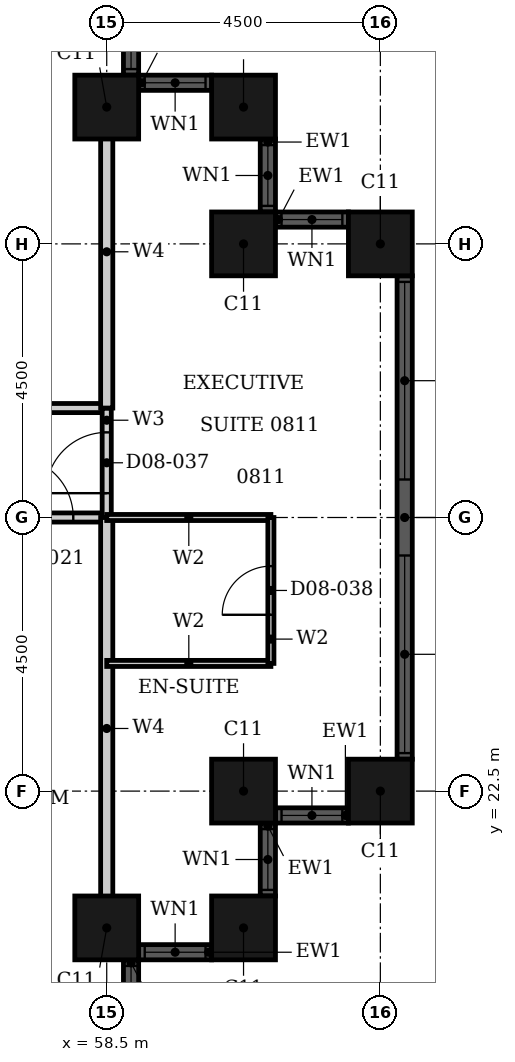
"""IFC4 building model, lengths in metres.
Left out: names, types, materials, properties, quantities, classifications, styles, units other than length and angle.
Written with IfcOpenShell. Run it as: python <this file> out.ifc"""

import sys

from ifc_helpers import new_model, si_unit, direction, frame, frame_2d, origin, origin_2d, place, context, subcontext, project, spatial, rectangle, hollow_rectangle, extrude, element, fill, save


model = new_model("IFC4")
c1 = context("Model", 3, precision=1e-05, world=origin(), true_north=direction((0.0, 1.0)))
c2 = subcontext(c1, "Body", "Model", "MODEL_VIEW")
j1 = project(units=[si_unit("LENGTHUNIT", "METRE"), si_unit("PLANEANGLEUNIT", "RADIAN")], contexts=[c1])
p1 = place(None, origin())
s1 = spatial("IfcSite", under=j1, at=p1, CompositionType="ELEMENT")
p2 = place(p1, origin())
s2 = spatial("IfcBuilding", under=s1, at=p2, CompositionType="ELEMENT")
p3 = place(p2, frame((0.0, 0.0, 40.8)))
s3 = spatial("IfcBuildingStorey", under=s2, at=p3, CompositionType="ELEMENT", Elevation=40.8)
for number, where, z_axis, x_axis in (
    (1, (58.5, 20.25, 0.0), (0.0, 0.0, 1.0), (1.0, 0.0, 0.0)),
    (2, (60.75, 20.25, 0.0), (0.0, 0.0, 1.0), (1.0, 0.0, 0.0)),
    (3, (60.75, 22.5, 0.0), (0.0, 0.0, 1.0), (1.0, 0.0, 0.0)),
    (4, (63.0, 22.5, 0.0), (0.0, 0.0, 1.0), (1.0, 0.0, 0.0)),
    (5, (63.0, 31.5, 0.0), (0.0, 0.0, 1.0), (1.0, 0.0, 0.0)),
    (6, (60.75, 31.5, 0.0), (0.0, 0.0, 1.0), (1.0, 0.0, 0.0)),
    (7, (60.75, 33.75, 0.0), (0.0, 0.0, 1.0), (1.0, 0.0, 0.0)),
    (8, (58.5, 33.75, 0.0), (0.0, 0.0, 1.0), (1.0, 0.0, 0.0)),
):
    element("IfcColumn", number, at=place(p3, frame(where, z_axis=z_axis, x_axis=x_axis)), inside=s3, PredefinedType="COLUMN", context=c2, shape_type="SweptSolid", body=[
        extrude(hollow_rectangle(XDim=1.05, YDim=1.05, WallThickness=0.034, at=origin_2d()), origin(), (0.0, 0.0, 1.0), 3.6),
    ])
p4 = place(p3, frame((58.9, 18.525, 0.0), z_axis=(0.0, 0.0, 1.0), x_axis=(0.0, 1.0, 0.0)))
e9 = element("IfcWall", 9, at=p4, inside=s3, PredefinedType="SOLIDWALL", context=c2, shape_type="SweptSolid", body=[
    extrude(rectangle(XDim=1.2, YDim=0.25, at=frame_2d((0.6, 0.0))), origin(), (0.0, 0.0, 1.0), 3.6),
])
p5 = place(p4, frame((0.1, 0.0, 0.9)))
e10 = element("IfcOpeningElement", 10, at=p5, cuts=e9, PredefinedType="OPENING", context=c2, shape_type="SweptSolid", body=[
    extrude(rectangle(XDim=1.0, YDim=2.08, at=frame_2d((0.5, 1.04))), frame((0.0, 0.135, 0.0), z_axis=(0.0, -1.0, 0.0), x_axis=(1.0, 0.0, 0.0)), (0.0, 0.0, 1.0), 0.27),
])
p6 = place(p3, frame((59.025, 19.85, 0.0), z_axis=(0.0, 0.0, 1.0), x_axis=(1.0, 0.0, 0.0)))
e11 = element("IfcWall", 11, at=p6, inside=s3, PredefinedType="SOLIDWALL", context=c2, shape_type="SweptSolid", body=[
    extrude(rectangle(XDim=1.2, YDim=0.25, at=frame_2d((0.6, 0.0))), origin(), (0.0, 0.0, 1.0), 3.6),
])
p7 = place(p6, frame((0.1, 0.0, 0.9)))
e12 = element("IfcOpeningElement", 12, at=p7, cuts=e11, PredefinedType="OPENING", context=c2, shape_type="SweptSolid", body=[
    extrude(rectangle(XDim=1.0, YDim=2.08, at=frame_2d((0.5, 1.04))), frame((0.0, 0.135, 0.0), z_axis=(0.0, -1.0, 0.0), x_axis=(1.0, 0.0, 0.0)), (0.0, 0.0, 1.0), 0.27),
])
p8 = place(p3, frame((61.15, 20.775, 0.0), z_axis=(0.0, 0.0, 1.0), x_axis=(0.0, 1.0, 0.0)))
e13 = element("IfcWall", 13, at=p8, inside=s3, PredefinedType="SOLIDWALL", context=c2, shape_type="SweptSolid", body=[
    extrude(rectangle(XDim=1.2, YDim=0.25, at=frame_2d((0.6, 0.0))), origin(), (0.0, 0.0, 1.0), 3.6),
])
p9 = place(p8, frame((0.1, 0.0, 0.9)))
e14 = element("IfcOpeningElement", 14, at=p9, cuts=e13, PredefinedType="OPENING", context=c2, shape_type="SweptSolid", body=[
    extrude(rectangle(XDim=1.0, YDim=2.08, at=frame_2d((0.5, 1.04))), frame((0.0, 0.135, 0.0), z_axis=(0.0, -1.0, 0.0), x_axis=(1.0, 0.0, 0.0)), (0.0, 0.0, 1.0), 0.27),
])
p10 = place(p3, frame((61.275, 22.1, 0.0), z_axis=(0.0, 0.0, 1.0), x_axis=(1.0, 0.0, 0.0)))
e15 = element("IfcWall", 15, at=p10, inside=s3, PredefinedType="SOLIDWALL", context=c2, shape_type="SweptSolid", body=[
    extrude(rectangle(XDim=1.2, YDim=0.25, at=frame_2d((0.6, 0.0))), origin(), (0.0, 0.0, 1.0), 3.6),
])
p11 = place(p10, frame((0.1, 0.0, 0.9)))
e16 = element("IfcOpeningElement", 16, at=p11, cuts=e15, PredefinedType="OPENING", context=c2, shape_type="SweptSolid", body=[
    extrude(rectangle(XDim=1.0, YDim=2.08, at=frame_2d((0.5, 1.04))), frame((0.0, 0.135, 0.0), z_axis=(0.0, -1.0, 0.0), x_axis=(1.0, 0.0, 0.0)), (0.0, 0.0, 1.0), 0.27),
])
p12 = place(p3, frame((63.4, 23.025, 0.0), z_axis=(0.0, 0.0, 1.0), x_axis=(0.0, 1.0, 0.0)))
e17 = element("IfcWall", 17, at=p12, inside=s3, PredefinedType="SOLIDWALL", context=c2, shape_type="SweptSolid", body=[
    extrude(rectangle(XDim=7.95, YDim=0.25, at=frame_2d((3.975, 0.0))), origin(), (0.0, 0.0, 1.0), 3.6),
])
p13 = place(p12, frame((0.1, 0.0, 0.9)))
e18 = element("IfcOpeningElement", 18, at=p13, cuts=e17, PredefinedType="OPENING", context=c2, shape_type="SweptSolid", body=[
    extrude(rectangle(XDim=3.25, YDim=2.08, at=frame_2d((1.625, 1.04))), frame((0.0, 0.135, 0.0), z_axis=(0.0, -1.0, 0.0), x_axis=(1.0, 0.0, 0.0)), (0.0, 0.0, 1.0), 0.27),
])
p14 = place(p12, frame((4.6, 0.0, 0.9)))
e19 = element("IfcOpeningElement", 19, at=p14, cuts=e17, PredefinedType="OPENING", context=c2, shape_type="SweptSolid", body=[
    extrude(rectangle(XDim=3.25, YDim=2.08, at=frame_2d((1.625, 1.04))), frame((0.0, 0.135, 0.0), z_axis=(0.0, -1.0, 0.0), x_axis=(1.0, 0.0, 0.0)), (0.0, 0.0, 1.0), 0.27),
])
p15 = place(p3, frame((62.475, 31.9, 0.0), z_axis=(0.0, 0.0, 1.0), x_axis=(-1.0, 0.0, 0.0)))
e20 = element("IfcWall", 20, at=p15, inside=s3, PredefinedType="SOLIDWALL", context=c2, shape_type="SweptSolid", body=[
    extrude(rectangle(XDim=1.2, YDim=0.25, at=frame_2d((0.6, 0.0))), origin(), (0.0, 0.0, 1.0), 3.6),
])
p16 = place(p15, frame((0.1, 0.0, 0.9)))
e21 = element("IfcOpeningElement", 21, at=p16, cuts=e20, PredefinedType="OPENING", context=c2, shape_type="SweptSolid", body=[
    extrude(rectangle(XDim=1.0, YDim=2.08, at=frame_2d((0.5, 1.04))), frame((0.0, 0.135, 0.0), z_axis=(0.0, -1.0, 0.0), x_axis=(1.0, 0.0, 0.0)), (0.0, 0.0, 1.0), 0.27),
])
p17 = place(p3, frame((61.15, 32.025, 0.0), z_axis=(0.0, 0.0, 1.0), x_axis=(0.0, 1.0, 0.0)))
e22 = element("IfcWall", 22, at=p17, inside=s3, PredefinedType="SOLIDWALL", context=c2, shape_type="SweptSolid", body=[
    extrude(rectangle(XDim=1.2, YDim=0.25, at=frame_2d((0.6, 0.0))), origin(), (0.0, 0.0, 1.0), 3.6),
])
p18 = place(p17, frame((0.1, 0.0, 0.9)))
e23 = element("IfcOpeningElement", 23, at=p18, cuts=e22, PredefinedType="OPENING", context=c2, shape_type="SweptSolid", body=[
    extrude(rectangle(XDim=1.0, YDim=2.08, at=frame_2d((0.5, 1.04))), frame((0.0, 0.135, 0.0), z_axis=(0.0, -1.0, 0.0), x_axis=(1.0, 0.0, 0.0)), (0.0, 0.0, 1.0), 0.27),
])
p19 = place(p3, frame((60.225, 34.15, 0.0), z_axis=(0.0, 0.0, 1.0), x_axis=(-1.0, 0.0, 0.0)))
e24 = element("IfcWall", 24, at=p19, inside=s3, PredefinedType="SOLIDWALL", context=c2, shape_type="SweptSolid", body=[
    extrude(rectangle(XDim=1.2, YDim=0.25, at=frame_2d((0.6, 0.0))), origin(), (0.0, 0.0, 1.0), 3.6),
])
p20 = place(p19, frame((0.1, 0.0, 0.9)))
e25 = element("IfcOpeningElement", 25, at=p20, cuts=e24, PredefinedType="OPENING", context=c2, shape_type="SweptSolid", body=[
    extrude(rectangle(XDim=1.0, YDim=2.08, at=frame_2d((0.5, 1.04))), frame((0.0, 0.135, 0.0), z_axis=(0.0, -1.0, 0.0), x_axis=(1.0, 0.0, 0.0)), (0.0, 0.0, 1.0), 0.27),
])
p21 = place(p3, frame((58.9, 34.275, 0.0), z_axis=(0.0, 0.0, 1.0), x_axis=(0.0, 1.0, 0.0)))
e26 = element("IfcWall", 26, at=p21, inside=s3, PredefinedType="SOLIDWALL", context=c2, shape_type="SweptSolid", body=[
    extrude(rectangle(XDim=1.2, YDim=0.25, at=frame_2d((0.6, 0.0))), origin(), (0.0, 0.0, 1.0), 3.6),
])
p22 = place(p21, frame((0.1, 0.0, 0.9)))
e27 = element("IfcOpeningElement", 27, at=p22, cuts=e26, PredefinedType="OPENING", context=c2, shape_type="SweptSolid", body=[
    extrude(rectangle(XDim=1.0, YDim=2.08, at=frame_2d((0.5, 1.04))), frame((0.0, 0.135, 0.0), z_axis=(0.0, -1.0, 0.0), x_axis=(1.0, 0.0, 0.0)), (0.0, 0.0, 1.0), 0.27),
])
p23 = place(p3, frame((46.8, 27.0, 0.0), z_axis=(0.0, 0.0, 1.0), x_axis=(1.0, 0.0, 0.0)))
e28 = element("IfcWall", 28, at=p23, inside=s3, PredefinedType="PARTITIONING", context=c2, shape_type="SweptSolid", body=[
    extrude(rectangle(XDim=11.7, YDim=0.15, at=frame_2d((5.85, 0.0))), origin(), (0.0, 0.0, 1.0), 2.58),
])
p24 = place(p23, frame((5.65, 0.0, 0.0)))
e29 = element("IfcOpeningElement", 29, at=p24, cuts=e28, PredefinedType="OPENING", context=c2, shape_type="SweptSolid", body=[
    extrude(rectangle(XDim=1.0, YDim=2.1, at=frame_2d((0.5, 1.05))), frame((0.0, 0.085, 0.0), z_axis=(0.0, -1.0, 0.0), x_axis=(1.0, 0.0, 0.0)), (0.0, 0.0, 1.0), 0.17),
])
p25 = place(p23, frame((10.15, 0.0, 0.0)))
e30 = element("IfcOpeningElement", 30, at=p25, cuts=e28, PredefinedType="OPENING", context=c2, shape_type="SweptSolid", body=[
    extrude(rectangle(XDim=1.0, YDim=2.1, at=frame_2d((0.5, 1.05))), frame((0.0, 0.085, 0.0), z_axis=(0.0, -1.0, 0.0), x_axis=(1.0, 0.0, 0.0)), (0.0, 0.0, 1.0), 0.17),
])
p26 = place(p3, frame((46.8, 28.8, 0.0), z_axis=(0.0, 0.0, 1.0), x_axis=(1.0, 0.0, 0.0)))
e31 = element("IfcWall", 31, at=p26, inside=s3, PredefinedType="PARTITIONING", context=c2, shape_type="SweptSolid", body=[
    extrude(rectangle(XDim=11.7, YDim=0.15, at=frame_2d((5.85, 0.0))), origin(), (0.0, 0.0, 1.0), 3.3),
])
p27 = place(p26, frame((4.45, 0.0, 0.0)))
e32 = element("IfcOpeningElement", 32, at=p27, cuts=e31, PredefinedType="OPENING", context=c2, shape_type="SweptSolid", body=[
    extrude(rectangle(XDim=1.0, YDim=2.1, at=frame_2d((0.5, 1.05))), frame((0.0, 0.085, 0.0), z_axis=(0.0, -1.0, 0.0), x_axis=(1.0, 0.0, 0.0)), (0.0, 0.0, 1.0), 0.17),
])
p28 = place(p3, frame((58.5, 27.0, 0.0), z_axis=(0.0, 0.0, 1.0), x_axis=(0.0, 1.0, 0.0)))
e33 = element("IfcWall", 33, at=p28, inside=s3, PredefinedType="PARTITIONING", context=c2, shape_type="SweptSolid", body=[
    extrude(rectangle(XDim=1.8, YDim=0.15, at=frame_2d((0.9, 0.0))), origin(), (0.0, 0.0, 1.0), 3.3),
])
p29 = place(p28, frame((0.4, 0.0, 0.0)))
e34 = element("IfcOpeningElement", 34, at=p29, cuts=e33, PredefinedType="OPENING", context=c2, shape_type="SweptSolid", body=[
    extrude(rectangle(XDim=1.0, YDim=2.1, at=frame_2d((0.5, 1.05))), frame((0.0, 0.085, 0.0), z_axis=(0.0, -1.0, 0.0), x_axis=(1.0, 0.0, 0.0)), (0.0, 0.0, 1.0), 0.17),
])
p30 = place(p3, frame((58.5, 20.06, 0.0), z_axis=(0.0, 0.0, 1.0), x_axis=(0.0, 1.0, 0.0)))
e35 = element("IfcWall", 35, at=p30, inside=s3, PredefinedType="PARTITIONING", context=c2, shape_type="SweptSolid", body=[
    extrude(rectangle(XDim=6.94, YDim=0.2, at=frame_2d((3.47, 0.0))), origin(), (0.0, 0.0, 1.0), 3.3),
])
p31 = place(p3, frame((58.5, 28.8, 0.0), z_axis=(0.0, 0.0, 1.0), x_axis=(0.0, 1.0, 0.0)))
e36 = element("IfcWall", 36, at=p31, inside=s3, PredefinedType="PARTITIONING", context=c2, shape_type="SweptSolid", body=[
    extrude(rectangle(XDim=5.14, YDim=0.2, at=frame_2d((2.57, 0.0))), origin(), (0.0, 0.0, 1.0), 3.3),
])
p32 = place(p3, frame((58.5, 24.6, 0.0), z_axis=(0.0, 0.0, 1.0), x_axis=(1.0, 0.0, 0.0)))
e37 = element("IfcWall", 37, at=p32, inside=s3, PredefinedType="PARTITIONING", context=c2, shape_type="SweptSolid", body=[
    extrude(rectangle(XDim=2.7, YDim=0.1, at=frame_2d((1.35, 0.0))), origin(), (0.0, 0.0, 1.0), 3.3),
])
p33 = place(p3, frame((58.5, 27.0, 0.0), z_axis=(0.0, 0.0, 1.0), x_axis=(1.0, 0.0, 0.0)))
e38 = element("IfcWall", 38, at=p33, inside=s3, PredefinedType="PARTITIONING", context=c2, shape_type="SweptSolid", body=[
    extrude(rectangle(XDim=2.7, YDim=0.1, at=frame_2d((1.35, 0.0))), origin(), (0.0, 0.0, 1.0), 2.58),
])
p34 = place(p3, frame((61.2, 24.6, 0.0), z_axis=(0.0, 0.0, 1.0), x_axis=(0.0, 1.0, 0.0)))
e39 = element("IfcWall", 39, at=p34, inside=s3, PredefinedType="PARTITIONING", context=c2, shape_type="SweptSolid", body=[
    extrude(rectangle(XDim=2.4, YDim=0.1, at=frame_2d((1.2, 0.0))), origin(), (0.0, 0.0, 1.0), 3.3),
])
p35 = place(p34, frame((0.8, 0.0, 0.0)))
e40 = element("IfcOpeningElement", 40, at=p35, cuts=e39, PredefinedType="OPENING", context=c2, shape_type="SweptSolid", body=[
    extrude(rectangle(XDim=0.8, YDim=2.1, at=frame_2d((0.4, 1.05))), frame((0.0, 0.06, 0.0), z_axis=(0.0, -1.0, 0.0), x_axis=(1.0, 0.0, 0.0)), (0.0, 0.0, 1.0), 0.12),
])
p36 = place(p5, origin())
e41 = element("IfcWindow", 41, at=p36, inside=s3, PartitioningType="SINGLE_PANEL", PredefinedType="WINDOW", context=c2, shape_type="SweptSolid", body=[
    extrude(rectangle(XDim=1.0, YDim=2.08, at=frame_2d((0.5, 1.04))), frame((0.0, 0.03, 0.0), z_axis=(0.0, -1.0, 0.0), x_axis=(1.0, 0.0, 0.0)), (0.0, 0.0, 1.0), 0.06),
])
fill(e10, e41)
p37 = place(p7, origin())
e42 = element("IfcWindow", 42, at=p37, inside=s3, PartitioningType="SINGLE_PANEL", PredefinedType="WINDOW", context=c2, shape_type="SweptSolid", body=[
    extrude(rectangle(XDim=1.0, YDim=2.08, at=frame_2d((0.5, 1.04))), frame((0.0, 0.03, 0.0), z_axis=(0.0, -1.0, 0.0), x_axis=(1.0, 0.0, 0.0)), (0.0, 0.0, 1.0), 0.06),
])
fill(e12, e42)
p38 = place(p9, origin())
e43 = element("IfcWindow", 43, at=p38, inside=s3, PartitioningType="SINGLE_PANEL", PredefinedType="WINDOW", context=c2, shape_type="SweptSolid", body=[
    extrude(rectangle(XDim=1.0, YDim=2.08, at=frame_2d((0.5, 1.04))), frame((0.0, 0.03, 0.0), z_axis=(0.0, -1.0, 0.0), x_axis=(1.0, 0.0, 0.0)), (0.0, 0.0, 1.0), 0.06),
])
fill(e14, e43)
p39 = place(p11, origin())
e44 = element("IfcWindow", 44, at=p39, inside=s3, PartitioningType="SINGLE_PANEL", PredefinedType="WINDOW", context=c2, shape_type="SweptSolid", body=[
    extrude(rectangle(XDim=1.0, YDim=2.08, at=frame_2d((0.5, 1.04))), frame((0.0, 0.03, 0.0), z_axis=(0.0, -1.0, 0.0), x_axis=(1.0, 0.0, 0.0)), (0.0, 0.0, 1.0), 0.06),
])
fill(e16, e44)
p40 = place(p13, origin())
e45 = element("IfcWindow", 45, at=p40, inside=s3, PartitioningType="SINGLE_PANEL", PredefinedType="WINDOW", context=c2, shape_type="SweptSolid", body=[
    extrude(rectangle(XDim=3.25, YDim=2.08, at=frame_2d((1.625, 1.04))), frame((0.0, 0.03, 0.0), z_axis=(0.0, -1.0, 0.0), x_axis=(1.0, 0.0, 0.0)), (0.0, 0.0, 1.0), 0.06),
])
fill(e18, e45)
p41 = place(p14, origin())
e46 = element("IfcWindow", 46, at=p41, inside=s3, PartitioningType="SINGLE_PANEL", PredefinedType="WINDOW", context=c2, shape_type="SweptSolid", body=[
    extrude(rectangle(XDim=3.25, YDim=2.08, at=frame_2d((1.625, 1.04))), frame((0.0, 0.03, 0.0), z_axis=(0.0, -1.0, 0.0), x_axis=(1.0, 0.0, 0.0)), (0.0, 0.0, 1.0), 0.06),
])
fill(e19, e46)
p42 = place(p16, origin())
e47 = element("IfcWindow", 47, at=p42, inside=s3, PartitioningType="SINGLE_PANEL", PredefinedType="WINDOW", context=c2, shape_type="SweptSolid", body=[
    extrude(rectangle(XDim=1.0, YDim=2.08, at=frame_2d((0.5, 1.04))), frame((0.0, 0.03, 0.0), z_axis=(0.0, -1.0, 0.0), x_axis=(1.0, 0.0, 0.0)), (0.0, 0.0, 1.0), 0.06),
])
fill(e21, e47)
p43 = place(p18, origin())
e48 = element("IfcWindow", 48, at=p43, inside=s3, PartitioningType="SINGLE_PANEL", PredefinedType="WINDOW", context=c2, shape_type="SweptSolid", body=[
    extrude(rectangle(XDim=1.0, YDim=2.08, at=frame_2d((0.5, 1.04))), frame((0.0, 0.03, 0.0), z_axis=(0.0, -1.0, 0.0), x_axis=(1.0, 0.0, 0.0)), (0.0, 0.0, 1.0), 0.06),
])
fill(e23, e48)
p44 = place(p20, origin())
e49 = element("IfcWindow", 49, at=p44, inside=s3, PartitioningType="SINGLE_PANEL", PredefinedType="WINDOW", context=c2, shape_type="SweptSolid", body=[
    extrude(rectangle(XDim=1.0, YDim=2.08, at=frame_2d((0.5, 1.04))), frame((0.0, 0.03, 0.0), z_axis=(0.0, -1.0, 0.0), x_axis=(1.0, 0.0, 0.0)), (0.0, 0.0, 1.0), 0.06),
])
fill(e25, e49)
p45 = place(p22, origin())
e50 = element("IfcWindow", 50, at=p45, inside=s3, PartitioningType="SINGLE_PANEL", PredefinedType="WINDOW", context=c2, shape_type="SweptSolid", body=[
    extrude(rectangle(XDim=1.0, YDim=2.08, at=frame_2d((0.5, 1.04))), frame((0.0, 0.03, 0.0), z_axis=(0.0, -1.0, 0.0), x_axis=(1.0, 0.0, 0.0)), (0.0, 0.0, 1.0), 0.06),
])
fill(e27, e50)
p46 = place(p25, origin())
e51 = element("IfcDoor", 51, at=p46, inside=s3, OperationType="SINGLE_SWING_RIGHT", PredefinedType="DOOR", context=c2, shape_type="SweptSolid", body=[
    extrude(rectangle(XDim=1.0, YDim=2.1, at=frame_2d((0.5, 1.05))), frame((0.0, 0.025, 0.0), z_axis=(0.0, -1.0, 0.0), x_axis=(1.0, 0.0, 0.0)), (0.0, 0.0, 1.0), 0.05),
])
fill(e30, e51)
p47 = place(p29, origin())
e52 = element("IfcDoor", 52, at=p47, inside=s3, OperationType="SINGLE_SWING_RIGHT", PredefinedType="DOOR", context=c2, shape_type="SweptSolid", body=[
    extrude(rectangle(XDim=1.0, YDim=2.1, at=frame_2d((0.5, 1.05))), frame((0.0, 0.025, 0.0), z_axis=(0.0, -1.0, 0.0), x_axis=(1.0, 0.0, 0.0)), (0.0, 0.0, 1.0), 0.05),
])
fill(e34, e52)
p48 = place(p35, origin())
e53 = element("IfcDoor", 53, at=p48, inside=s3, OperationType="SINGLE_SWING_LEFT", PredefinedType="DOOR", context=c2, shape_type="SweptSolid", body=[
    extrude(rectangle(XDim=0.8, YDim=2.1, at=frame_2d((0.4, 1.05))), frame((0.0, 0.025, 0.0), z_axis=(0.0, -1.0, 0.0), x_axis=(1.0, 0.0, 0.0)), (0.0, 0.0, 1.0), 0.05),
])
fill(e40, e53)
save(model, sys.argv[1])
